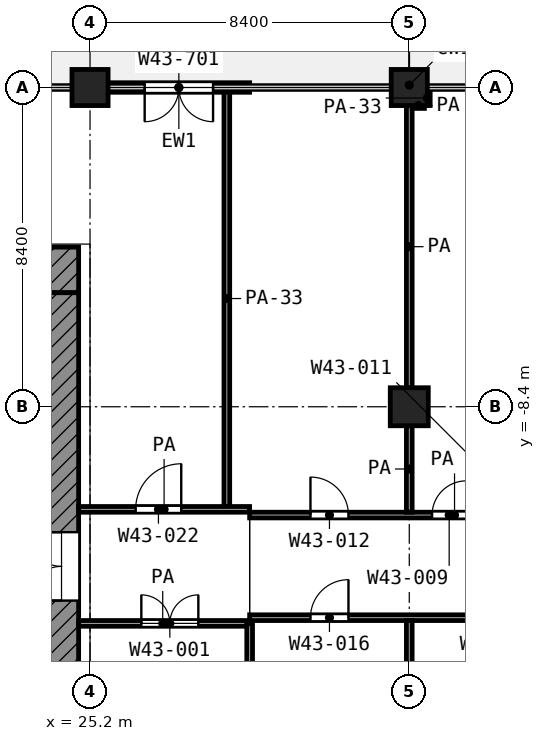
"""IFC4 building model, lengths in metres.
Left out: names, types, materials, properties, quantities, classifications, styles, units other than length and angle.
Written with IfcOpenShell. Run it as: python <this file> out.ifc"""

import sys

from ifc_helpers import new_model, si_unit, direction, frame, frame_2d, origin, origin_2d, place, context, subcontext, project, spatial, rectangle, extrude, element, fill, save


model = new_model("IFC4")
c1 = context("Model", 3, precision=1e-05, world=origin(), true_north=direction((0.0, 1.0)))
c2 = subcontext(c1, "Body", "Model", "MODEL_VIEW")
j1 = project(units=[si_unit("LENGTHUNIT", "METRE"), si_unit("PLANEANGLEUNIT", "RADIAN")], contexts=[c1])
p1 = place(None, origin())
s1 = spatial("IfcSite", under=j1, at=p1, CompositionType="ELEMENT")
p2 = place(p1, origin())
s2 = spatial("IfcBuilding", under=s1, at=p2, CompositionType="ELEMENT")
p3 = place(p2, frame((0.0, 0.0, 187.8)))
s3 = spatial("IfcBuildingStorey", under=s2, at=p3, CompositionType="ELEMENT", Elevation=187.8)
for number, where, z_axis, x_axis in (
    (1, (25.2, 0.0, 0.0), (0.0, 0.0, 1.0), (1.0, 0.0, 0.0)),
    (2, (33.6, 0.0, 0.0), (0.0, 0.0, 1.0), (1.0, 0.0, 0.0)),
):
    element("IfcColumn", number, at=place(p3, frame(where, z_axis=z_axis, x_axis=x_axis)), inside=s3, PredefinedType="COLUMN", context=c2, shape_type="SweptSolid", body=[
        extrude(rectangle(XDim=0.95, YDim=0.95, at=origin_2d()), origin(), (0.0, 0.0, 1.0), 4.2),
    ])
p4 = place(p3, frame((33.6, -8.4, 0.0), z_axis=(0.0, 0.0, 1.0), x_axis=(1.0, 0.0, 0.0)))
e3 = element("IfcColumn", 3, at=p4, inside=s3, PredefinedType="COLUMN", context=c2, shape_type="SweptSolid", body=[
    extrude(rectangle(XDim=1.0, YDim=1.0, at=origin_2d()), origin(), (0.0, 0.0, 1.0), 4.2),
])
p5 = place(p3, frame((29.4, 0.0, 0.0), z_axis=(0.0, 0.0, 1.0), x_axis=(-1.0, 0.0, 0.0)))
e4 = element("IfcWall", 4, at=p5, inside=s3, PredefinedType="SOLIDWALL", context=c2, shape_type="SweptSolid", body=[
    extrude(rectangle(XDim=3.725, YDim=0.25, at=frame_2d((1.862, 0.0))), origin(), (0.0, 0.0, 1.0), 2.58),
])
p6 = place(p5, frame((0.962, 0.0, 0.0)))
e5 = element("IfcOpeningElement", 5, at=p6, cuts=e4, PredefinedType="OPENING", context=c2, shape_type="SweptSolid", body=[
    extrude(rectangle(XDim=1.8, YDim=2.1, at=frame_2d((0.9, 1.05))), frame((0.0, 0.135, 0.0), z_axis=(0.0, -1.0, 0.0), x_axis=(1.0, 0.0, 0.0)), (0.0, 0.0, 1.0), 0.27),
])
p7 = place(p3, frame((4.2, -4.8, 0.0), z_axis=(0.0, 0.0, 1.0), x_axis=(1.0, 0.0, 0.0)))
e6 = element("IfcWall", 6, at=p7, inside=s3, PredefinedType="SHEAR", context=c2, shape_type="SweptSolid", body=[
    extrude(rectangle(XDim=20.7, YDim=1.2, at=frame_2d((10.35, 0.0))), origin(), (0.0, 0.0, 1.0), 3.6),
])
p8 = place(p7, frame((1.95, 0.0, 0.0)))
e7 = element("IfcOpeningElement", 7, at=p8, cuts=e6, PredefinedType="OPENING", context=c2, shape_type="SweptSolid", body=[
    extrude(rectangle(XDim=1.1, YDim=2.1, at=frame_2d((0.55, 1.05))), frame((0.0, 0.61, 0.0), z_axis=(0.0, -1.0, 0.0), x_axis=(1.0, 0.0, 0.0)), (0.0, 0.0, 1.0), 1.22),
])
p9 = place(p7, frame((17.95, 0.0, 0.0)))
e8 = element("IfcOpeningElement", 8, at=p9, cuts=e6, PredefinedType="OPENING", context=c2, shape_type="SweptSolid", body=[
    extrude(rectangle(XDim=1.1, YDim=2.1, at=frame_2d((0.55, 1.05))), frame((0.0, 0.61, 0.0), z_axis=(0.0, -1.0, 0.0), x_axis=(1.0, 0.0, 0.0)), (0.0, 0.0, 1.0), 1.22),
])
p10 = place(p3, frame((24.45, -24.0, 0.0), z_axis=(0.0, 0.0, 1.0), x_axis=(0.0, 1.0, 0.0)))
e9 = element("IfcWall", 9, at=p10, inside=s3, PredefinedType="SHEAR", context=c2, shape_type="SweptSolid", body=[
    extrude(rectangle(XDim=18.6, YDim=0.9, at=frame_2d((9.3, 0.0))), origin(), (0.0, 0.0, 1.0), 3.6),
])
p11 = place(p10, frame((10.5, 0.0, 0.0)))
e10 = element("IfcOpeningElement", 10, at=p11, cuts=e9, PredefinedType="OPENING", context=c2, shape_type="SweptSolid", body=[
    extrude(rectangle(XDim=1.8, YDim=2.1, at=frame_2d((0.9, 1.05))), frame((0.0, 0.46, 0.0), z_axis=(0.0, -1.0, 0.0), x_axis=(1.0, 0.0, 0.0)), (0.0, 0.0, 1.0), 0.92),
])
p12 = place(p3, frame((24.9, -14.1, 0.0), z_axis=(0.0, 0.0, 1.0), x_axis=(1.0, 0.0, 0.0)))
e11 = element("IfcWall", 11, at=p12, inside=s3, PredefinedType="PARTITIONING", context=c2, shape_type="SweptSolid", body=[
    extrude(rectangle(XDim=4.425, YDim=0.15, at=frame_2d((2.212, 0.0))), origin(), (0.0, 0.0, 1.0), 3.6),
])
p13 = place(p12, frame((1.65, 0.0, 0.0)))
e12 = element("IfcOpeningElement", 12, at=p13, cuts=e11, PredefinedType="OPENING", context=c2, shape_type="SweptSolid", body=[
    extrude(rectangle(XDim=1.5, YDim=2.1, at=frame_2d((0.75, 1.05))), frame((0.0, 0.085, 0.0), z_axis=(0.0, -1.0, 0.0), x_axis=(1.0, 0.0, 0.0)), (0.0, 0.0, 1.0), 0.17),
])
p14 = place(p3, frame((29.4, -13.95, 0.0), z_axis=(0.0, 0.0, 1.0), x_axis=(1.0, 0.0, 0.0)))
e13 = element("IfcWall", 13, at=p14, inside=s3, PredefinedType="PARTITIONING", context=c2, shape_type="SweptSolid", body=[
    extrude(rectangle(XDim=37.72, YDim=0.15, at=frame_2d((18.86, 0.0))), origin(), (0.0, 0.0, 1.0), 3.6),
])
p15 = place(p14, frame((1.6, 0.0, 0.0)))
e14 = element("IfcOpeningElement", 14, at=p15, cuts=e13, PredefinedType="OPENING", context=c2, shape_type="SweptSolid", body=[
    extrude(rectangle(XDim=1.0, YDim=2.1, at=frame_2d((0.5, 1.05))), frame((0.0, 0.085, 0.0), z_axis=(0.0, -1.0, 0.0), x_axis=(1.0, 0.0, 0.0)), (0.0, 0.0, 1.0), 0.17),
])
p16 = place(p14, frame((6.0, 0.0, 0.0)))
e15 = element("IfcOpeningElement", 15, at=p16, cuts=e13, PredefinedType="OPENING", context=c2, shape_type="SweptSolid", body=[
    extrude(rectangle(XDim=1.2, YDim=2.1, at=frame_2d((0.6, 1.05))), frame((0.0, 0.085, 0.0), z_axis=(0.0, -1.0, 0.0), x_axis=(1.0, 0.0, 0.0)), (0.0, 0.0, 1.0), 0.17),
])
p17 = place(p14, frame((12.975, 0.0, 0.0)))
e16 = element("IfcOpeningElement", 16, at=p17, cuts=e13, PredefinedType="OPENING", context=c2, shape_type="SweptSolid", body=[
    extrude(rectangle(XDim=1.2, YDim=2.1, at=frame_2d((0.6, 1.05))), frame((0.0, 0.085, 0.0), z_axis=(0.0, -1.0, 0.0), x_axis=(1.0, 0.0, 0.0)), (0.0, 0.0, 1.0), 0.17),
])
p18 = place(p14, frame((11.45, 0.0, 0.0)))
e17 = element("IfcOpeningElement", 17, at=p18, cuts=e13, PredefinedType="OPENING", context=c2, shape_type="SweptSolid", body=[
    extrude(rectangle(XDim=1.2, YDim=2.1, at=frame_2d((0.6, 1.05))), frame((0.0, 0.085, 0.0), z_axis=(0.0, -1.0, 0.0), x_axis=(1.0, 0.0, 0.0)), (0.0, 0.0, 1.0), 0.17),
])
p19 = place(p14, frame((14.85, 0.0, 0.0)))
e18 = element("IfcOpeningElement", 18, at=p19, cuts=e13, PredefinedType="OPENING", context=c2, shape_type="SweptSolid", body=[
    extrude(rectangle(XDim=1.2, YDim=2.1, at=frame_2d((0.6, 1.05))), frame((0.0, 0.085, 0.0), z_axis=(0.0, -1.0, 0.0), x_axis=(1.0, 0.0, 0.0)), (0.0, 0.0, 1.0), 0.17),
])
p20 = place(p14, frame((21.6, 0.0, 0.0)))
e19 = element("IfcOpeningElement", 19, at=p20, cuts=e13, PredefinedType="OPENING", context=c2, shape_type="SweptSolid", body=[
    extrude(rectangle(XDim=1.2, YDim=2.1, at=frame_2d((0.6, 1.05))), frame((0.0, 0.085, 0.0), z_axis=(0.0, -1.0, 0.0), x_axis=(1.0, 0.0, 0.0)), (0.0, 0.0, 1.0), 0.17),
])
p21 = place(p14, frame((20.1, 0.0, 0.0)))
e20 = element("IfcOpeningElement", 20, at=p21, cuts=e13, PredefinedType="OPENING", context=c2, shape_type="SweptSolid", body=[
    extrude(rectangle(XDim=1.2, YDim=2.1, at=frame_2d((0.6, 1.05))), frame((0.0, 0.085, 0.0), z_axis=(0.0, -1.0, 0.0), x_axis=(1.0, 0.0, 0.0)), (0.0, 0.0, 1.0), 0.17),
])
p22 = place(p14, frame((18.85, 0.0, 0.0)))
e21 = element("IfcOpeningElement", 21, at=p22, cuts=e13, PredefinedType="OPENING", context=c2, shape_type="SweptSolid", body=[
    extrude(rectangle(XDim=0.9, YDim=2.1, at=frame_2d((0.45, 1.05))), frame((0.0, 0.085, 0.0), z_axis=(0.0, -1.0, 0.0), x_axis=(1.0, 0.0, 0.0)), (0.0, 0.0, 1.0), 0.17),
])
p23 = place(p14, frame((23.85, 0.0, 0.0)))
e22 = element("IfcOpeningElement", 22, at=p23, cuts=e13, PredefinedType="OPENING", context=c2, shape_type="SweptSolid", body=[
    extrude(rectangle(XDim=1.2, YDim=2.1, at=frame_2d((0.6, 1.05))), frame((0.0, 0.085, 0.0), z_axis=(0.0, -1.0, 0.0), x_axis=(1.0, 0.0, 0.0)), (0.0, 0.0, 1.0), 0.17),
])
p24 = place(p14, frame((29.475, 0.0, 0.0)))
e23 = element("IfcOpeningElement", 23, at=p24, cuts=e13, PredefinedType="OPENING", context=c2, shape_type="SweptSolid", body=[
    extrude(rectangle(XDim=1.2, YDim=2.1, at=frame_2d((0.6, 1.05))), frame((0.0, 0.085, 0.0), z_axis=(0.0, -1.0, 0.0), x_axis=(1.0, 0.0, 0.0)), (0.0, 0.0, 1.0), 0.17),
])
p25 = place(p14, frame((27.95, 0.0, 0.0)))
e24 = element("IfcOpeningElement", 24, at=p25, cuts=e13, PredefinedType="OPENING", context=c2, shape_type="SweptSolid", body=[
    extrude(rectangle(XDim=1.2, YDim=2.1, at=frame_2d((0.6, 1.05))), frame((0.0, 0.085, 0.0), z_axis=(0.0, -1.0, 0.0), x_axis=(1.0, 0.0, 0.0)), (0.0, 0.0, 1.0), 0.17),
])
p26 = place(p14, frame((31.35, 0.0, 0.0)))
e25 = element("IfcOpeningElement", 25, at=p26, cuts=e13, PredefinedType="OPENING", context=c2, shape_type="SweptSolid", body=[
    extrude(rectangle(XDim=1.2, YDim=2.1, at=frame_2d((0.6, 1.05))), frame((0.0, 0.085, 0.0), z_axis=(0.0, -1.0, 0.0), x_axis=(1.0, 0.0, 0.0)), (0.0, 0.0, 1.0), 0.17),
])
p27 = place(p14, frame((34.9, 0.0, 0.0)))
e26 = element("IfcOpeningElement", 26, at=p27, cuts=e13, PredefinedType="OPENING", context=c2, shape_type="SweptSolid", body=[
    extrude(rectangle(XDim=1.0, YDim=2.1, at=frame_2d((0.5, 1.05))), frame((0.0, 0.085, 0.0), z_axis=(0.0, -1.0, 0.0), x_axis=(1.0, 0.0, 0.0)), (0.0, 0.0, 1.0), 0.17),
])
p28 = place(p3, frame((29.4, -11.25, 0.0), z_axis=(0.0, 0.0, 1.0), x_axis=(1.0, 0.0, 0.0)))
e27 = element("IfcWall", 27, at=p28, inside=s3, PredefinedType="PARTITIONING", context=c2, shape_type="SweptSolid", body=[
    extrude(rectangle(XDim=10.782, YDim=0.15, at=frame_2d((5.391, 0.0))), origin(), (0.0, 0.0, 1.0), 3.6),
])
p29 = place(p28, frame((1.6, 0.0, 0.0)))
e28 = element("IfcOpeningElement", 28, at=p29, cuts=e27, PredefinedType="OPENING", context=c2, shape_type="SweptSolid", body=[
    extrude(rectangle(XDim=1.0, YDim=2.1, at=frame_2d((0.5, 1.05))), frame((0.0, 0.085, 0.0), z_axis=(0.0, -1.0, 0.0), x_axis=(1.0, 0.0, 0.0)), (0.0, 0.0, 1.0), 0.17),
])
p30 = place(p28, frame((4.8, 0.0, 0.0)))
e29 = element("IfcOpeningElement", 29, at=p30, cuts=e27, PredefinedType="OPENING", context=c2, shape_type="SweptSolid", body=[
    extrude(rectangle(XDim=0.9, YDim=2.1, at=frame_2d((0.45, 1.05))), frame((0.0, 0.085, 0.0), z_axis=(0.0, -1.0, 0.0), x_axis=(1.0, 0.0, 0.0)), (0.0, 0.0, 1.0), 0.17),
])
p31 = place(p28, frame((6.85, 0.0, 0.0)))
e30 = element("IfcOpeningElement", 30, at=p31, cuts=e27, PredefinedType="OPENING", context=c2, shape_type="SweptSolid", body=[
    extrude(rectangle(XDim=1.0, YDim=2.1, at=frame_2d((0.5, 1.05))), frame((0.0, 0.085, 0.0), z_axis=(0.0, -1.0, 0.0), x_axis=(1.0, 0.0, 0.0)), (0.0, 0.0, 1.0), 0.17),
])
p32 = place(p3, frame((24.9, -11.1, 0.0), z_axis=(0.0, 0.0, 1.0), x_axis=(1.0, 0.0, 0.0)))
e31 = element("IfcWall", 31, at=p32, inside=s3, PredefinedType="PARTITIONING", context=c2, shape_type="SweptSolid", body=[
    extrude(rectangle(XDim=4.498, YDim=0.15, at=frame_2d((2.249, 0.0))), origin(), (0.0, 0.0, 1.0), 3.6),
])
p33 = place(p32, frame((1.5, 0.0, 0.0)))
e32 = element("IfcOpeningElement", 32, at=p33, cuts=e31, PredefinedType="OPENING", context=c2, shape_type="SweptSolid", body=[
    extrude(rectangle(XDim=1.2, YDim=2.1, at=frame_2d((0.6, 1.05))), frame((0.0, 0.085, 0.0), z_axis=(0.0, -1.0, 0.0), x_axis=(1.0, 0.0, 0.0)), (0.0, 0.0, 1.0), 0.17),
])
p34 = place(p3, frame((33.677, -0.475, 0.0), z_axis=(0.0, 0.0, 1.0), x_axis=(1.0, 0.0, 0.0)))
e33 = element("IfcWall", 33, at=p34, inside=s3, PredefinedType="PARTITIONING", context=c2, shape_type="SweptSolid", body=[
    extrude(rectangle(XDim=0.321, YDim=0.15, at=frame_2d((0.161, 0.0))), origin(), (0.0, 0.0, 1.0), 3.6),
])
p35 = place(p3, frame((28.8, -11.025, 0.0), z_axis=(0.0, 0.0, 1.0), x_axis=(0.0, 1.0, 0.0)))
e34 = element("IfcWall", 34, at=p35, inside=s3, PredefinedType="PARTITIONING", context=c2, shape_type="SweptSolid", body=[
    extrude(rectangle(XDim=10.945, YDim=0.15, at=frame_2d((5.472, 0.0))), origin(), (0.0, 0.0, 1.0), 2.7),
])
p36 = place(p3, frame((29.4, -31.198, 0.0), z_axis=(0.0, 0.0, 1.0), x_axis=(0.0, 1.0, 0.0)))
e35 = element("IfcWall", 35, at=p36, inside=s3, PredefinedType="PARTITIONING", context=c2, shape_type="SweptSolid", body=[
    extrude(rectangle(XDim=17.098, YDim=0.15, at=frame_2d((8.549, 0.0))), origin(), (0.0, 0.0, 1.0), 3.6),
])
p37 = place(p3, frame((33.6, -31.12, 0.0), z_axis=(0.0, 0.0, 1.0), x_axis=(0.0, 1.0, 0.0)))
e36 = element("IfcWall", 36, at=p37, inside=s3, PredefinedType="PARTITIONING", context=c2, shape_type="SweptSolid", body=[
    extrude(rectangle(XDim=17.095, YDim=0.15, at=frame_2d((8.548, 0.0))), origin(), (0.0, 0.0, 1.0), 3.6),
])
p38 = place(p3, frame((33.6, -11.175, 0.0), z_axis=(0.0, 0.0, 1.0), x_axis=(0.0, 1.0, 0.0)))
e37 = element("IfcWall", 37, at=p38, inside=s3, PredefinedType="PARTITIONING", context=c2, shape_type="SweptSolid", body=[
    extrude(rectangle(XDim=2.275, YDim=0.15, at=frame_2d((1.138, 0.0))), origin(), (0.0, 0.0, 1.0), 3.6),
])
p39 = place(p3, frame((33.6, -7.9, 0.0), z_axis=(0.0, 0.0, 1.0), x_axis=(0.0, 1.0, 0.0)))
e38 = element("IfcWall", 38, at=p39, inside=s3, PredefinedType="PARTITIONING", context=c2, shape_type="SweptSolid", body=[
    extrude(rectangle(XDim=7.423, YDim=0.15, at=frame_2d((3.711, 0.0))), origin(), (0.0, 0.0, 1.0), 3.6),
])
p40 = place(p3, frame((34.075, -0.473, 0.0), z_axis=(0.0, 0.0, 1.0), x_axis=(0.0, 1.0, 0.0)))
e39 = element("IfcWall", 39, at=p40, inside=s3, PredefinedType="PARTITIONING", context=c2, shape_type="SweptSolid", body=[
    extrude(rectangle(XDim=0.393, YDim=0.15, at=frame_2d((0.196, 0.0))), origin(), (0.0, 0.0, 1.0), 2.7),
])
p41 = place(p6, origin())
e40 = element("IfcDoor", 40, at=p41, inside=s3, OperationType="DOUBLE_DOOR_SINGLE_SWING", PredefinedType="DOOR", context=c2, shape_type="SweptSolid", body=[
    extrude(rectangle(XDim=1.8, YDim=2.1, at=frame_2d((0.9, 1.05))), frame((0.0, 0.025, 0.0), z_axis=(0.0, -1.0, 0.0), x_axis=(1.0, 0.0, 0.0)), (0.0, 0.0, 1.0), 0.05),
])
fill(e5, e40)
p42 = place(p11, origin())
e41 = element("IfcDoor", 41, at=p42, inside=s3, OperationType="DOUBLE_DOOR_SINGLE_SWING", PredefinedType="DOOR", context=c2, shape_type="SweptSolid", body=[
    extrude(rectangle(XDim=1.8, YDim=2.1, at=frame_2d((0.9, 1.05))), frame((0.0, 0.025, 0.0), z_axis=(0.0, -1.0, 0.0), x_axis=(1.0, 0.0, 0.0)), (0.0, 0.0, 1.0), 0.05),
])
fill(e10, e41)
p43 = place(p13, origin())
e42 = element("IfcDoor", 42, at=p43, inside=s3, OperationType="DOUBLE_DOOR_SINGLE_SWING", PredefinedType="DOOR", context=c2, shape_type="SweptSolid", body=[
    extrude(rectangle(XDim=1.5, YDim=2.1, at=frame_2d((0.75, 1.05))), frame((0.0, 0.025, 0.0), z_axis=(0.0, -1.0, 0.0), x_axis=(1.0, 0.0, 0.0)), (0.0, 0.0, 1.0), 0.05),
])
fill(e12, e42)
p44 = place(p33, origin())
e43 = element("IfcDoor", 43, at=p44, inside=s3, OperationType="SINGLE_SWING_RIGHT", PredefinedType="DOOR", context=c2, shape_type="SweptSolid", body=[
    extrude(rectangle(XDim=1.2, YDim=2.1, at=frame_2d((0.6, 1.05))), frame((0.0, 0.025, 0.0), z_axis=(0.0, -1.0, 0.0), x_axis=(1.0, 0.0, 0.0)), (0.0, 0.0, 1.0), 0.05),
])
fill(e32, e43)
p45 = place(p29, origin())
e44 = element("IfcDoor", 44, at=p45, inside=s3, OperationType="SINGLE_SWING_LEFT", PredefinedType="DOOR", context=c2, shape_type="SweptSolid", body=[
    extrude(rectangle(XDim=1.0, YDim=2.1, at=frame_2d((0.5, 1.05))), frame((0.0, 0.025, 0.0), z_axis=(0.0, -1.0, 0.0), x_axis=(1.0, 0.0, 0.0)), (0.0, 0.0, 1.0), 0.05),
])
fill(e28, e44)
p46 = place(p15, origin())
e45 = element("IfcDoor", 45, at=p46, inside=s3, OperationType="SINGLE_SWING_RIGHT", PredefinedType="DOOR", context=c2, shape_type="SweptSolid", body=[
    extrude(rectangle(XDim=1.0, YDim=2.1, at=frame_2d((0.5, 1.05))), frame((0.0, 0.025, 0.0), z_axis=(0.0, -1.0, 0.0), x_axis=(1.0, 0.0, 0.0)), (0.0, 0.0, 1.0), 0.05),
])
fill(e14, e45)
p47 = place(p30, origin())
e46 = element("IfcDoor", 46, at=p47, inside=s3, OperationType="SINGLE_SWING_RIGHT", PredefinedType="DOOR", context=c2, shape_type="SweptSolid", body=[
    extrude(rectangle(XDim=0.9, YDim=2.1, at=frame_2d((0.45, 1.05))), frame((0.0, 0.025, 0.0), z_axis=(0.0, -1.0, 0.0), x_axis=(1.0, 0.0, 0.0)), (0.0, 0.0, 1.0), 0.05),
])
fill(e29, e46)
save(model, sys.argv[1])
